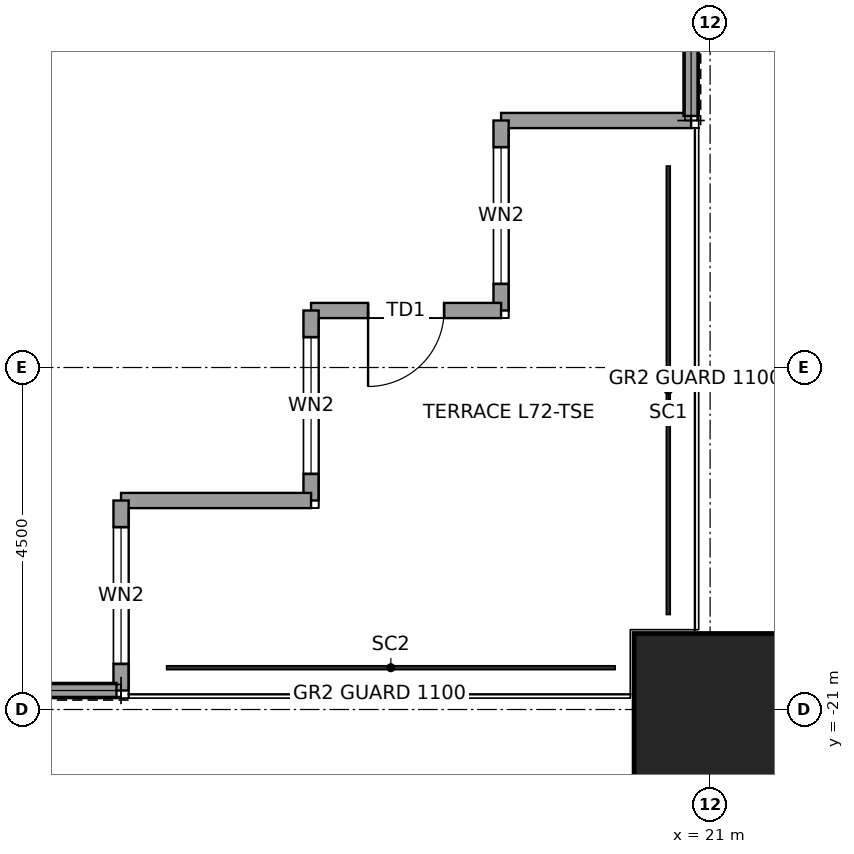
"""IFC4 building model, lengths in metres.
Left out: names, types, materials, properties, quantities, classifications, styles, units other than length and angle.
Written with IfcOpenShell. Run it as: python <this file> out.ifc"""

import sys

from ifc_helpers import new_model, si_unit, direction, frame, frame_2d, origin, origin_2d, place, context, subcontext, project, spatial, rectangle, hollow_rectangle, extrude, element, fill, save


model = new_model("IFC4")
c1 = context("Model", 3, precision=1e-05, world=origin(), true_north=direction((0.0, 1.0)))
c2 = subcontext(c1, "Body", "Model", "MODEL_VIEW")
j1 = project(units=[si_unit("LENGTHUNIT", "METRE"), si_unit("PLANEANGLEUNIT", "RADIAN")], contexts=[c1])
p1 = place(None, origin())
s1 = spatial("IfcSite", under=j1, at=p1, CompositionType="ELEMENT")
p2 = place(p1, origin())
s2 = spatial("IfcBuilding", under=s1, at=p2, CompositionType="ELEMENT")
p3 = place(p2, frame((0.0, 0.0, 323.9)))
s3 = spatial("IfcBuildingStorey", under=s2, at=p3, CompositionType="ELEMENT", Elevation=323.9)
p4 = place(p3, frame((21.0, -21.0, 0.0), z_axis=(0.0, 0.0, 1.0), x_axis=(1.0, 0.0, 0.0)))
e1 = element("IfcColumn", 1, at=p4, inside=s3, PredefinedType="COLUMN", context=c2, shape_type="SweptSolid", body=[
    extrude(hollow_rectangle(XDim=2.0, YDim=2.0, WallThickness=0.095, at=origin_2d()), origin(), (0.0, 0.0, 1.0), 4.0),
])
p5 = place(p3, frame((20.75, -13.25, 0.0), z_axis=(0.0, 0.0, 1.0), x_axis=(-1.0, 0.0, 0.0)))
e2 = element("IfcWall", 2, at=p5, inside=s3, PredefinedType="SOLIDWALL", context=c2, shape_type="SweptSolid", body=[
    extrude(rectangle(XDim=2.5, YDim=0.2, at=frame_2d((1.25, 0.0))), origin(), (0.0, 0.0, 1.0), 3.85),
])
p6 = place(p3, frame((18.25, -13.25, 0.0), z_axis=(0.0, 0.0, 1.0), x_axis=(0.0, -1.0, 0.0)))
e3 = element("IfcWall", 3, at=p6, inside=s3, PredefinedType="SOLIDWALL", context=c2, shape_type="SweptSolid", body=[
    extrude(rectangle(XDim=2.5, YDim=0.2, at=frame_2d((1.25, 0.0))), origin(), (0.0, 0.0, 1.0), 3.85),
])
p7 = place(p6, frame((0.35, 0.0, 0.3)))
e4 = element("IfcOpeningElement", 4, at=p7, cuts=e3, PredefinedType="OPENING", context=c2, shape_type="SweptSolid", body=[
    extrude(rectangle(XDim=1.8, YDim=2.4, at=frame_2d((0.9, 1.2))), frame((0.0, 0.11, 0.0), z_axis=(0.0, -1.0, 0.0), x_axis=(1.0, 0.0, 0.0)), (0.0, 0.0, 1.0), 0.22),
])
p8 = place(p3, frame((18.25, -15.75, 0.0), z_axis=(0.0, 0.0, 1.0), x_axis=(-1.0, 0.0, 0.0)))
e5 = element("IfcWall", 5, at=p8, inside=s3, PredefinedType="SOLIDWALL", context=c2, shape_type="SweptSolid", body=[
    extrude(rectangle(XDim=2.5, YDim=0.2, at=frame_2d((1.25, 0.0))), origin(), (0.0, 0.0, 1.0), 3.317),
])
p9 = place(p8, frame((0.75, 0.0, 0.0)))
e6 = element("IfcOpeningElement", 6, at=p9, cuts=e5, PredefinedType="OPENING", context=c2, shape_type="SweptSolid", body=[
    extrude(rectangle(XDim=1.0, YDim=2.4, at=frame_2d((0.5, 1.2))), frame((0.0, 0.11, 0.0), z_axis=(0.0, -1.0, 0.0), x_axis=(1.0, 0.0, 0.0)), (0.0, 0.0, 1.0), 0.22),
])
p10 = place(p3, frame((15.75, -15.75, 0.0), z_axis=(0.0, 0.0, 1.0), x_axis=(0.0, -1.0, 0.0)))
e7 = element("IfcWall", 7, at=p10, inside=s3, PredefinedType="SOLIDWALL", context=c2, shape_type="SweptSolid", body=[
    extrude(rectangle(XDim=2.5, YDim=0.2, at=frame_2d((1.25, 0.0))), origin(), (0.0, 0.0, 1.0), 3.85),
])
p11 = place(p10, frame((0.35, 0.0, 0.3)))
e8 = element("IfcOpeningElement", 8, at=p11, cuts=e7, PredefinedType="OPENING", context=c2, shape_type="SweptSolid", body=[
    extrude(rectangle(XDim=1.8, YDim=2.4, at=frame_2d((0.9, 1.2))), frame((0.0, 0.11, 0.0), z_axis=(0.0, -1.0, 0.0), x_axis=(1.0, 0.0, 0.0)), (0.0, 0.0, 1.0), 0.22),
])
p12 = place(p3, frame((15.75, -18.25, 0.0), z_axis=(0.0, 0.0, 1.0), x_axis=(-1.0, 0.0, 0.0)))
e9 = element("IfcWall", 9, at=p12, inside=s3, PredefinedType="SOLIDWALL", context=c2, shape_type="SweptSolid", body=[
    extrude(rectangle(XDim=2.5, YDim=0.2, at=frame_2d((1.25, 0.0))), origin(), (0.0, 0.0, 1.0), 3.85),
])
p13 = place(p3, frame((13.25, -18.25, 0.0), z_axis=(0.0, 0.0, 1.0), x_axis=(0.0, -1.0, 0.0)))
e10 = element("IfcWall", 10, at=p13, inside=s3, PredefinedType="SOLIDWALL", context=c2, shape_type="SweptSolid", body=[
    extrude(rectangle(XDim=2.5, YDim=0.2, at=frame_2d((1.25, 0.0))), origin(), (0.0, 0.0, 1.0), 3.85),
])
p14 = place(p13, frame((0.35, 0.0, 0.3)))
e11 = element("IfcOpeningElement", 11, at=p14, cuts=e10, PredefinedType="OPENING", context=c2, shape_type="SweptSolid", body=[
    extrude(rectangle(XDim=1.8, YDim=2.4, at=frame_2d((0.9, 1.2))), frame((0.0, 0.11, 0.0), z_axis=(0.0, -1.0, 0.0), x_axis=(1.0, 0.0, 0.0)), (0.0, 0.0, 1.0), 0.22),
])
for number, where, z_axis, x_axis in (
    (12, (20.75, -10.405, 0.0), (0.0, 0.0, 1.0), (0.0, -1.0, 0.0)),
    (13, (13.19, -20.75, 0.0), (0.0, 0.0, 1.0), (-1.0, 0.0, 0.0)),
):
    element("IfcWall", number, at=place(p3, frame(where, z_axis=z_axis, x_axis=x_axis)), inside=s3, PredefinedType="SOLIDWALL", context=c2, shape_type="SweptSolid", body=[
        extrude(rectangle(XDim=2.785, YDim=0.2, at=frame_2d((1.393, 0.0))), origin(), (0.0, 0.0, 1.0), 3.85),
    ])
p15 = place(p7, origin())
e14 = element("IfcWindow", 14, at=p15, inside=s3, PartitioningType="SINGLE_PANEL", PredefinedType="WINDOW", context=c2, shape_type="SweptSolid", body=[
    extrude(rectangle(XDim=1.8, YDim=2.4, at=frame_2d((0.9, 1.2))), frame((0.0, 0.03, 0.0), z_axis=(0.0, -1.0, 0.0), x_axis=(1.0, 0.0, 0.0)), (0.0, 0.0, 1.0), 0.06),
])
fill(e4, e14)
p16 = place(p9, origin())
e15 = element("IfcDoor", 15, at=p16, inside=s3, OperationType="SINGLE_SWING_RIGHT", PredefinedType="DOOR", context=c2, shape_type="SweptSolid", body=[
    extrude(rectangle(XDim=1.0, YDim=2.4, at=frame_2d((0.5, 1.2))), frame((0.0, 0.025, 0.0), z_axis=(0.0, -1.0, 0.0), x_axis=(1.0, 0.0, 0.0)), (0.0, 0.0, 1.0), 0.05),
])
fill(e6, e15)
p17 = place(p11, origin())
e16 = element("IfcWindow", 16, at=p17, inside=s3, PartitioningType="SINGLE_PANEL", PredefinedType="WINDOW", context=c2, shape_type="SweptSolid", body=[
    extrude(rectangle(XDim=1.8, YDim=2.4, at=frame_2d((0.9, 1.2))), frame((0.0, 0.03, 0.0), z_axis=(0.0, -1.0, 0.0), x_axis=(1.0, 0.0, 0.0)), (0.0, 0.0, 1.0), 0.06),
])
fill(e8, e16)
p18 = place(p14, origin())
e17 = element("IfcWindow", 17, at=p18, inside=s3, PartitioningType="SINGLE_PANEL", PredefinedType="WINDOW", context=c2, shape_type="SweptSolid", body=[
    extrude(rectangle(XDim=1.8, YDim=2.4, at=frame_2d((0.9, 1.2))), frame((0.0, 0.03, 0.0), z_axis=(0.0, -1.0, 0.0), x_axis=(1.0, 0.0, 0.0)), (0.0, 0.0, 1.0), 0.06),
])
fill(e11, e17)
save(model, sys.argv[1])
